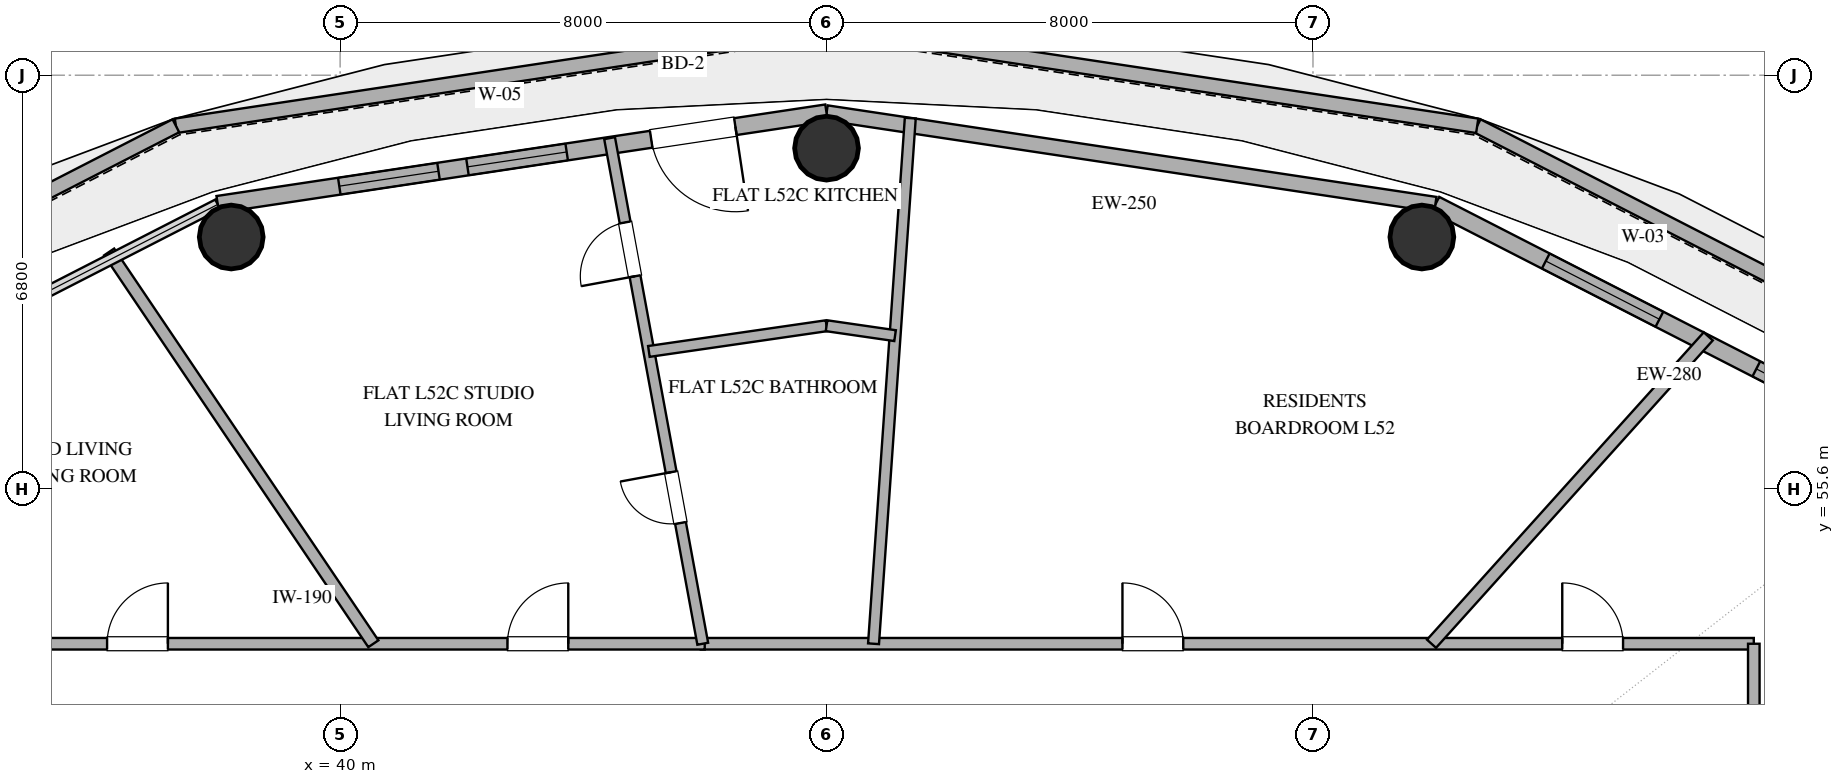
"""IFC4 building model, lengths in metres.
Left out: names, types, materials, properties, quantities, classifications, styles, units other than length and angle.
Written with IfcOpenShell. Run it as: python <this file> out.ifc"""

import sys

from ifc_helpers import new_model, si_unit, direction, frame, frame_2d, origin, origin_2d, place, context, subcontext, project, spatial, rectangle, hollow_circle, extrude, element, fill, save


model = new_model("IFC4")
c1 = context("Model", 3, precision=1e-05, world=origin(), true_north=direction((0.0, 1.0)))
c2 = subcontext(c1, "Body", "Model", "MODEL_VIEW")
j1 = project(units=[si_unit("LENGTHUNIT", "METRE"), si_unit("PLANEANGLEUNIT", "RADIAN")], contexts=[c1])
p1 = place(None, origin())
s1 = spatial("IfcSite", under=j1, at=p1, CompositionType="ELEMENT")
p2 = place(p1, origin())
s2 = spatial("IfcBuilding", under=s1, at=p2, CompositionType="ELEMENT")
p3 = place(p2, frame((0.0, 0.0, 206.4)))
s3 = spatial("IfcBuildingStorey", under=s2, at=p3, CompositionType="ELEMENT", Elevation=206.4)
for number, where, z_axis, x_axis in (
    (1, (57.791, 59.739, 0.0), (0.0, 0.0, 1.0), (1.0, 0.0, 0.0)),
    (2, (48.0, 61.2, 0.0), (0.0, 0.0, 1.0), (1.0, 0.0, 0.0)),
    (3, (38.209, 59.739, 0.0), (0.0, 0.0, 1.0), (1.0, 0.0, 0.0)),
):
    element("IfcColumn", number, at=place(p3, frame(where, z_axis=z_axis, x_axis=x_axis)), inside=s3, PredefinedType="COLUMN", context=c2, shape_type="SweptSolid", body=[
        extrude(hollow_circle(Radius=0.525, WallThickness=0.028, at=origin_2d()), origin(), (0.0, 0.0, 1.0), 3.36),
    ])
p4 = place(p3, frame((67.646, 56.977, 0.0), z_axis=(0.0, 0.0, 1.0), x_axis=(-0.889652072391, 0.456639015077, 0.0)))
e4 = element("IfcWall", 4, at=p4, inside=s3, PredefinedType="PARAPET", context=c2, shape_type="SweptSolid", body=[
    extrude(rectangle(XDim=10.055, YDim=0.24, at=frame_2d((5.027, 0.0))), origin(), (0.0, 0.0, 1.0), 1.25),
])
for number, where, z_axis, x_axis in (
    (5, (58.701, 61.568, 0.0), (0.0, 0.0, 1.0), (-0.989, 0.149, 0.0)),
    (6, (48.0, 63.18, 0.0), (0.0, 0.0, 1.0), (-0.989, -0.149, 0.0)),
):
    element("IfcWall", number, at=place(p3, frame(where, z_axis=z_axis, x_axis=x_axis)), inside=s3, PredefinedType="PARAPET", context=c2, shape_type="SweptSolid", body=[
        extrude(rectangle(XDim=10.822, YDim=0.24, at=frame_2d((5.411, 0.0))), origin(), (0.0, 0.0, 1.0), 1.25),
    ])
p5 = place(p3, frame((37.299, 61.568, 0.0), z_axis=(0.0, 0.0, 1.0), x_axis=(-0.889652072391, -0.456639015077, 0.0)))
e7 = element("IfcWall", 7, at=p5, inside=s3, PredefinedType="PARAPET", context=c2, shape_type="SweptSolid", body=[
    extrude(rectangle(XDim=10.055, YDim=0.24, at=frame_2d((5.027, 0.0))), origin(), (0.0, 0.0, 1.0), 1.25),
])
p6 = place(p3, frame((66.383, 55.987, 0.0), z_axis=(0.0, 0.0, 1.0), x_axis=(-0.890007394051, 0.455946091699, 0.0)))
e8 = element("IfcWall", 8, at=p6, inside=s3, PredefinedType="SOLIDWALL", context=c2, shape_type="SweptSolid", body=[
    extrude(rectangle(XDim=9.404, YDim=0.28, at=frame_2d((4.702, 0.0))), origin(), (0.0, 0.0, 1.0), 3.36),
])
p7 = place(p6, frame((2.273, 0.0, 0.85)))
e9 = element("IfcOpeningElement", 9, at=p7, cuts=e8, PredefinedType="OPENING", context=c2, shape_type="SweptSolid", body=[
    extrude(rectangle(XDim=1.2, YDim=1.6, at=frame_2d((0.6, 0.8))), frame((0.0, 0.15, 0.0), z_axis=(0.0, -1.0, 0.0), x_axis=(1.0, 0.0, 0.0)), (0.0, 0.0, 1.0), 0.3),
])
p8 = place(p6, frame((5.264, 0.0, 0.85)))
e10 = element("IfcOpeningElement", 10, at=p8, cuts=e8, PredefinedType="OPENING", context=c2, shape_type="SweptSolid", body=[
    extrude(rectangle(XDim=2.1, YDim=2.2, at=frame_2d((1.05, 1.1))), frame((0.0, 0.15, 0.0), z_axis=(0.0, -1.0, 0.0), x_axis=(1.0, 0.0, 0.0)), (0.0, 0.0, 1.0), 0.3),
])
p9 = place(p3, frame((58.013, 60.274, 0.0), z_axis=(0.0, 0.0, 1.0), x_axis=(-0.988882522213, 0.148698881169, 0.0)))
e11 = element("IfcWall", 11, at=p9, inside=s3, PredefinedType="SOLIDWALL", context=c2, shape_type="SweptSolid", body=[
    extrude(rectangle(XDim=10.125, YDim=0.25, at=frame_2d((5.062, 0.0))), origin(), (0.0, 0.0, 1.0), 3.36),
])
p10 = place(p3, frame((48.0, 61.78, 0.0), z_axis=(0.0, 0.0, 1.0), x_axis=(-0.988882522213, -0.148698881169, 0.0)))
e12 = element("IfcWall", 12, at=p10, inside=s3, PredefinedType="SOLIDWALL", context=c2, shape_type="SweptSolid", body=[
    extrude(rectangle(XDim=10.125, YDim=0.28, at=frame_2d((5.062, 0.0))), origin(), (0.0, 0.0, 1.0), 3.36),
])
p11 = place(p10, frame((1.516, 0.0, 0.0)))
e13 = element("IfcOpeningElement", 13, at=p11, cuts=e12, PredefinedType="OPENING", context=c2, shape_type="SweptSolid", body=[
    extrude(rectangle(XDim=1.4, YDim=2.2, at=frame_2d((0.7, 1.1))), frame((0.0, 0.15, 0.0), z_axis=(0.0, -1.0, 0.0), x_axis=(1.0, 0.0, 0.0)), (0.0, 0.0, 1.0), 0.3),
])
p12 = place(p10, frame((4.322, 0.0, 0.85)))
e14 = element("IfcOpeningElement", 14, at=p12, cuts=e12, PredefinedType="OPENING", context=c2, shape_type="SweptSolid", body=[
    extrude(rectangle(XDim=1.65, YDim=2.0, at=frame_2d((0.825, 1.0))), frame((0.0, 0.15, 0.0), z_axis=(0.0, -1.0, 0.0), x_axis=(1.0, 0.0, 0.0)), (0.0, 0.0, 1.0), 0.3),
])
p13 = place(p10, frame((6.454, 0.0, 0.85)))
e15 = element("IfcOpeningElement", 15, at=p13, cuts=e12, PredefinedType="OPENING", context=c2, shape_type="SweptSolid", body=[
    extrude(rectangle(XDim=1.65, YDim=2.0, at=frame_2d((0.825, 1.0))), frame((0.0, 0.15, 0.0), z_axis=(0.0, -1.0, 0.0), x_axis=(1.0, 0.0, 0.0)), (0.0, 0.0, 1.0), 0.3),
])
p14 = place(p3, frame((45.931, 53.05, 0.0), z_axis=(0.0, 0.0, 1.0), x_axis=(1.0, 0.0, 0.0)))
e16 = element("IfcWall", 16, at=p14, inside=s3, PredefinedType="PARTITIONING", context=c2, shape_type="SweptSolid", body=[
    extrude(rectangle(XDim=17.319, YDim=0.19, at=frame_2d((8.659, 0.0))), origin(), (0.0, 0.0, 1.0), 2.72),
])
p15 = place(p14, frame((6.935, 0.0, 0.0)))
e17 = element("IfcOpeningElement", 17, at=p15, cuts=e16, PredefinedType="OPENING", context=c2, shape_type="SweptSolid", body=[
    extrude(rectangle(XDim=1.0, YDim=2.2, at=frame_2d((0.5, 1.1))), frame((0.0, 0.105, 0.0), z_axis=(0.0, -1.0, 0.0), x_axis=(1.0, 0.0, 0.0)), (0.0, 0.0, 1.0), 0.21),
])
p16 = place(p14, frame((14.168, 0.0, 0.0)))
e18 = element("IfcOpeningElement", 18, at=p16, cuts=e16, PredefinedType="OPENING", context=c2, shape_type="SweptSolid", body=[
    extrude(rectangle(XDim=1.0, YDim=2.2, at=frame_2d((0.5, 1.1))), frame((0.0, 0.105, 0.0), z_axis=(0.0, -1.0, 0.0), x_axis=(1.0, 0.0, 0.0)), (0.0, 0.0, 1.0), 0.21),
])
p17 = place(p3, frame((32.75, 53.05, 0.0), z_axis=(0.0, 0.0, 1.0), x_axis=(1.0, 0.0, 0.0)))
e19 = element("IfcWall", 19, at=p17, inside=s3, PredefinedType="PARTITIONING", context=c2, shape_type="SweptSolid", body=[
    extrude(rectangle(XDim=13.247, YDim=0.19, at=frame_2d((6.623, 0.0))), origin(), (0.0, 0.0, 1.0), 2.72),
])
p18 = place(p17, frame((3.417, 0.0, 0.0)))
e20 = element("IfcOpeningElement", 20, at=p18, cuts=e19, PredefinedType="OPENING", context=c2, shape_type="SweptSolid", body=[
    extrude(rectangle(XDim=1.0, YDim=2.2, at=frame_2d((0.5, 1.1))), frame((0.0, 0.105, 0.0), z_axis=(0.0, -1.0, 0.0), x_axis=(1.0, 0.0, 0.0)), (0.0, 0.0, 1.0), 0.21),
])
p19 = place(p17, frame((10.002, 0.0, 0.0)))
e21 = element("IfcOpeningElement", 21, at=p19, cuts=e19, PredefinedType="OPENING", context=c2, shape_type="SweptSolid", body=[
    extrude(rectangle(XDim=1.0, YDim=2.2, at=frame_2d((0.5, 1.1))), frame((0.0, 0.105, 0.0), z_axis=(0.0, -1.0, 0.0), x_axis=(1.0, 0.0, 0.0)), (0.0, 0.0, 1.0), 0.21),
])
p20 = place(p3, frame((40.547, 53.05, 0.0), z_axis=(0.0, 0.0, 1.0), x_axis=(-0.559208454265, 0.8290270832, 0.0)))
e22 = element("IfcWall", 22, at=p20, inside=s3, PredefinedType="PARTITIONING", context=c2, shape_type="SweptSolid", body=[
    extrude(rectangle(XDim=7.771, YDim=0.2, at=frame_2d((3.886, 0.0))), origin(), (0.0, 0.0, 1.0), 2.72),
])
p21 = place(p3, frame((57.949, 53.05, 0.0), z_axis=(0.0, 0.0, 1.0), x_axis=(0.66913524162, 0.743140651844, 0.0)))
e23 = element("IfcWall", 23, at=p21, inside=s3, PredefinedType="PARTITIONING", context=c2, shape_type="SweptSolid", body=[
    extrude(rectangle(XDim=6.802, YDim=0.2, at=frame_2d((3.401, 0.0))), origin(), (0.0, 0.0, 1.0), 2.72),
])
p22 = place(p3, frame((48.773, 53.05, 0.0), z_axis=(0.0, 0.0, 1.0), x_axis=(0.069763237321, 0.997563577281, 0.0)))
e24 = element("IfcWall", 24, at=p22, inside=s3, PredefinedType="PLUMBINGWALL", context=c2, shape_type="SweptSolid", body=[
    extrude(rectangle(XDim=8.665, YDim=0.18, at=frame_2d((4.333, 0.0))), origin(), (0.0, 0.0, 1.0), 2.72),
])
p23 = place(p3, frame((45.964, 53.05, 0.0), z_axis=(0.0, 0.0, 1.0), x_axis=(-0.181227840828, 0.983441136881, 0.0)))
e25 = element("IfcWall", 25, at=p23, inside=s3, PredefinedType="PLUMBINGWALL", context=c2, shape_type="SweptSolid", body=[
    extrude(rectangle(XDim=8.455, YDim=0.18, at=frame_2d((4.227, 0.0))), origin(), (0.0, 0.0, 1.0), 2.72),
])
p24 = place(p23, frame((2.019, 0.0, 0.0)))
e26 = element("IfcOpeningElement", 26, at=p24, cuts=e25, PredefinedType="OPENING", context=c2, shape_type="SweptSolid", body=[
    extrude(rectangle(XDim=0.85, YDim=2.1, at=frame_2d((0.425, 1.05))), frame((0.0, 0.1, 0.0), z_axis=(0.0, -1.0, 0.0), x_axis=(1.0, 0.0, 0.0)), (0.0, 0.0, 1.0), 0.2),
])
p25 = place(p23, frame((6.145, 0.0, 0.0)))
e27 = element("IfcOpeningElement", 27, at=p25, cuts=e25, PredefinedType="OPENING", context=c2, shape_type="SweptSolid", body=[
    extrude(rectangle(XDim=0.9, YDim=2.1, at=frame_2d((0.45, 1.05))), frame((0.0, 0.1, 0.0), z_axis=(0.0, -1.0, 0.0), x_axis=(1.0, 0.0, 0.0)), (0.0, 0.0, 1.0), 0.2),
])
p26 = place(p3, frame((63.25, 45.35, 0.0), z_axis=(0.0, 0.0, 1.0), x_axis=(0.0, 1.0, 0.0)))
e28 = element("IfcWall", 28, at=p26, inside=s3, PredefinedType="PARTITIONING", context=c2, shape_type="SweptSolid", body=[
    extrude(rectangle(XDim=7.7, YDim=0.19, at=frame_2d((3.85, 0.0))), origin(), (0.0, 0.0, 1.0), 2.72),
])
p27 = place(p3, frame((45.078, 57.857, 0.0), z_axis=(0.0, 0.0, 1.0), x_axis=(0.989678113628, 0.143308169361, 0.0)))
e29 = element("IfcWall", 29, at=p27, inside=s3, PredefinedType="PLUMBINGWALL", context=c2, shape_type="SweptSolid", body=[
    extrude(rectangle(XDim=2.952, YDim=0.18, at=frame_2d((1.476, 0.0))), origin(), (0.0, 0.0, 1.0), 2.72),
])
p28 = place(p3, frame((48.0, 58.28, 0.0), z_axis=(0.0, 0.0, 1.0), x_axis=(0.989660157939, -0.143432115611, 0.0)))
e30 = element("IfcWall", 30, at=p28, inside=s3, PredefinedType="PLUMBINGWALL", context=c2, shape_type="SweptSolid", body=[
    extrude(rectangle(XDim=1.139, YDim=0.18, at=frame_2d((0.569, 0.0))), origin(), (0.0, 0.0, 1.0), 2.72),
])
p29 = place(p7, origin())
e31 = element("IfcWindow", 31, at=p29, inside=s3, PartitioningType="SINGLE_PANEL", PredefinedType="WINDOW", context=c2, shape_type="SweptSolid", body=[
    extrude(rectangle(XDim=1.2, YDim=1.6, at=frame_2d((0.6, 0.8))), frame((0.0, 0.03, 0.0), z_axis=(0.0, -1.0, 0.0), x_axis=(1.0, 0.0, 0.0)), (0.0, 0.0, 1.0), 0.06),
])
fill(e9, e31)
p30 = place(p8, origin())
e32 = element("IfcWindow", 32, at=p30, inside=s3, PartitioningType="SINGLE_PANEL", PredefinedType="WINDOW", context=c2, shape_type="SweptSolid", body=[
    extrude(rectangle(XDim=2.1, YDim=2.2, at=frame_2d((1.05, 1.1))), frame((0.0, 0.03, 0.0), z_axis=(0.0, -1.0, 0.0), x_axis=(1.0, 0.0, 0.0)), (0.0, 0.0, 1.0), 0.06),
])
fill(e10, e32)
p31 = place(p11, origin())
e33 = element("IfcDoor", 33, at=p31, inside=s3, OperationType="SINGLE_SWING_LEFT", PredefinedType="DOOR", context=c2, shape_type="SweptSolid", body=[
    extrude(rectangle(XDim=1.4, YDim=2.2, at=frame_2d((0.7, 1.1))), frame((0.0, 0.025, 0.0), z_axis=(0.0, -1.0, 0.0), x_axis=(1.0, 0.0, 0.0)), (0.0, 0.0, 1.0), 0.05),
])
fill(e13, e33)
p32 = place(p12, origin())
e34 = element("IfcWindow", 34, at=p32, inside=s3, PartitioningType="SINGLE_PANEL", PredefinedType="WINDOW", context=c2, shape_type="SweptSolid", body=[
    extrude(rectangle(XDim=1.65, YDim=2.0, at=frame_2d((0.825, 1.0))), frame((0.0, 0.03, 0.0), z_axis=(0.0, -1.0, 0.0), x_axis=(1.0, 0.0, 0.0)), (0.0, 0.0, 1.0), 0.06),
])
fill(e14, e34)
p33 = place(p13, origin())
e35 = element("IfcWindow", 35, at=p33, inside=s3, PartitioningType="SINGLE_PANEL", PredefinedType="WINDOW", context=c2, shape_type="SweptSolid", body=[
    extrude(rectangle(XDim=1.65, YDim=2.0, at=frame_2d((0.825, 1.0))), frame((0.0, 0.03, 0.0), z_axis=(0.0, -1.0, 0.0), x_axis=(1.0, 0.0, 0.0)), (0.0, 0.0, 1.0), 0.06),
])
fill(e15, e35)
p34 = place(p15, origin())
e36 = element("IfcDoor", 36, at=p34, inside=s3, OperationType="SINGLE_SWING_LEFT", PredefinedType="DOOR", context=c2, shape_type="SweptSolid", body=[
    extrude(rectangle(XDim=1.0, YDim=2.2, at=frame_2d((0.5, 1.1))), frame((0.0, 0.025, 0.0), z_axis=(0.0, -1.0, 0.0), x_axis=(1.0, 0.0, 0.0)), (0.0, 0.0, 1.0), 0.05),
])
fill(e17, e36)
p35 = place(p16, origin())
e37 = element("IfcDoor", 37, at=p35, inside=s3, OperationType="SINGLE_SWING_LEFT", PredefinedType="DOOR", context=c2, shape_type="SweptSolid", body=[
    extrude(rectangle(XDim=1.0, YDim=2.2, at=frame_2d((0.5, 1.1))), frame((0.0, 0.025, 0.0), z_axis=(0.0, -1.0, 0.0), x_axis=(1.0, 0.0, 0.0)), (0.0, 0.0, 1.0), 0.05),
])
fill(e18, e37)
p36 = place(p18, origin())
e38 = element("IfcDoor", 38, at=p36, inside=s3, OperationType="SINGLE_SWING_RIGHT", PredefinedType="DOOR", context=c2, shape_type="SweptSolid", body=[
    extrude(rectangle(XDim=1.0, YDim=2.2, at=frame_2d((0.5, 1.1))), frame((0.0, 0.025, 0.0), z_axis=(0.0, -1.0, 0.0), x_axis=(1.0, 0.0, 0.0)), (0.0, 0.0, 1.0), 0.05),
])
fill(e20, e38)
p37 = place(p19, origin())
e39 = element("IfcDoor", 39, at=p37, inside=s3, OperationType="SINGLE_SWING_RIGHT", PredefinedType="DOOR", context=c2, shape_type="SweptSolid", body=[
    extrude(rectangle(XDim=1.0, YDim=2.2, at=frame_2d((0.5, 1.1))), frame((0.0, 0.025, 0.0), z_axis=(0.0, -1.0, 0.0), x_axis=(1.0, 0.0, 0.0)), (0.0, 0.0, 1.0), 0.05),
])
fill(e21, e39)
p38 = place(p24, origin())
e40 = element("IfcDoor", 40, at=p38, inside=s3, OperationType="SINGLE_SWING_RIGHT", PredefinedType="DOOR", context=c2, shape_type="SweptSolid", body=[
    extrude(rectangle(XDim=0.85, YDim=2.1, at=frame_2d((0.425, 1.05))), frame((0.0, 0.025, 0.0), z_axis=(0.0, -1.0, 0.0), x_axis=(1.0, 0.0, 0.0)), (0.0, 0.0, 1.0), 0.05),
])
fill(e26, e40)
p39 = place(p25, origin())
e41 = element("IfcDoor", 41, at=p39, inside=s3, OperationType="SINGLE_SWING_LEFT", PredefinedType="DOOR", context=c2, shape_type="SweptSolid", body=[
    extrude(rectangle(XDim=0.9, YDim=2.1, at=frame_2d((0.45, 1.05))), frame((0.0, 0.025, 0.0), z_axis=(0.0, -1.0, 0.0), x_axis=(1.0, 0.0, 0.0)), (0.0, 0.0, 1.0), 0.05),
])
fill(e27, e41)
save(model, sys.argv[1])
